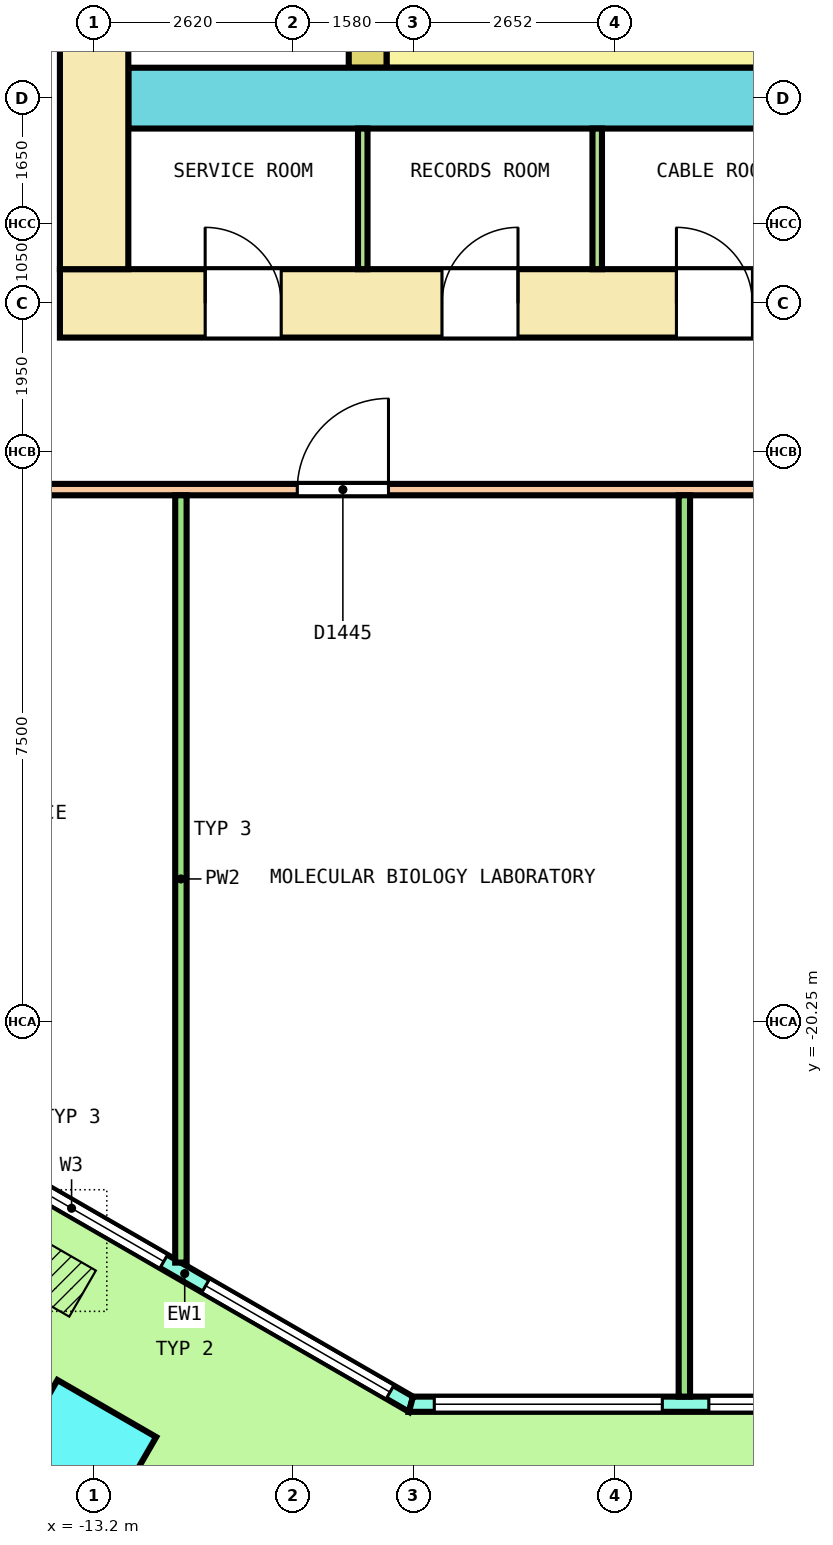
"""IFC4 building model, lengths in metres.
Left out: names, types, materials, properties, quantities, classifications, styles, units other than length and angle.
Written with IfcOpenShell. Run it as: python <this file> out.ifc"""

import sys

from ifc_helpers import new_model, si_unit, direction, frame, frame_2d, origin, origin_2d, place, context, subcontext, project, spatial, polyline, rectangle, outline, extrude, element, fill, save


model = new_model("IFC4")
c1 = context("Model", 3, precision=1e-05, world=origin(), true_north=direction((0.0, 1.0)))
c2 = subcontext(c1, "Body", "Model", "MODEL_VIEW")
j1 = project(units=[si_unit("LENGTHUNIT", "METRE"), si_unit("PLANEANGLEUNIT", "RADIAN")], contexts=[c1])
p1 = place(None, origin())
s1 = spatial("IfcSite", under=j1, at=p1, CompositionType="ELEMENT")
p2 = place(p1, origin())
s2 = spatial("IfcBuilding", under=s1, at=p2, CompositionType="ELEMENT")
p3 = place(p2, frame((0.0, 0.0, 58.6)))
s3 = spatial("IfcBuildingStorey", under=s2, at=p3, CompositionType="ELEMENT", Elevation=58.6)
p4 = place(p3, frame((-13.408, -25.989, 0.0), z_axis=(0.0, 0.0, 1.0), x_axis=(0.866025403784, -0.5, 0.0)))
e1 = element("IfcColumn", 1, at=p4, inside=s3, PredefinedType="COLUMN", context=c2, shape_type="SweptSolid", body=[
    extrude(rectangle(XDim=1.5, YDim=1.5, at=origin_2d()), origin(), (0.0, 0.0, 1.0), 4.05),
])
p5 = place(p3, frame((-14.985, -21.845, 0.0), z_axis=(0.0, 0.0, 1.0), x_axis=(0.866029458321, -0.49999297727, 0.0)))
e2 = element("IfcWall", 2, at=p5, inside=s3, PredefinedType="SOLIDWALL", context=c2, shape_type="SweptSolid", body=[
    extrude(outline(polyline([(-0.027, -0.1), (1.128, -0.1), (2.282, -0.1), (3.437, -0.1), (4.592, -0.1), (5.747, -0.1), (6.901, -0.1), (6.848, 0.1), (5.711, 0.1), (4.574, 0.1), (3.437, 0.1), (2.301, 0.1), (1.164, 0.1), (0.027, 0.1), (-0.027, -0.1)])), origin(), (0.0, 0.0, 1.0), 4.1),
])
p6 = place(p5, frame((0.319, 0.0, 0.1)))
e3 = element("IfcOpeningElement", 3, at=p6, cuts=e2, PredefinedType="OPENING", context=c2, shape_type="SweptSolid", body=[
    extrude(rectangle(XDim=2.8, YDim=2.9, at=frame_2d((1.4, 1.45))), frame((0.0, 0.11, 0.0), z_axis=(0.0, -1.0, 0.0), x_axis=(1.0, 0.0, 0.0)), (0.0, 0.0, 1.0), 0.22),
])
p7 = place(p5, frame((3.756, 0.0, 0.1)))
e4 = element("IfcOpeningElement", 4, at=p7, cuts=e2, PredefinedType="OPENING", context=c2, shape_type="SweptSolid", body=[
    extrude(rectangle(XDim=2.8, YDim=2.9, at=frame_2d((1.4, 1.45))), frame((0.0, 0.11, 0.0), z_axis=(0.0, -1.0, 0.0), x_axis=(1.0, 0.0, 0.0)), (0.0, 0.0, 1.0), 0.22),
])
p8 = place(p3, frame((-9.031, -25.283, 0.0), z_axis=(0.0, 0.0, 1.0), x_axis=(1.0, 0.0, 0.0)))
e5 = element("IfcWall", 5, at=p8, inside=s3, PredefinedType="SOLIDWALL", context=c2, shape_type="SweptSolid", body=[
    extrude(outline(polyline([(-0.027, -0.1), (0.979, -0.1), (1.986, -0.1), (2.992, -0.1), (3.999, -0.1), (5.005, -0.1), (6.012, -0.1), (7.018, -0.1), (8.025, -0.1), (9.031, -0.1), (10.038, -0.1), (11.044, -0.1), (12.051, -0.1), (13.057, -0.1), (14.063, -0.1), (15.07, -0.1), (16.076, -0.1), (17.083, -0.1), (18.089, -0.1), (18.036, 0.1), (17.035, 0.1), (16.035, 0.1), (15.034, 0.1), (14.034, 0.1), (13.033, 0.1), (12.033, 0.1), (11.032, 0.1), (10.032, 0.1), (9.031, 0.1), (8.031, 0.1), (7.03, 0.1), (6.03, 0.1), (5.029, 0.1), (4.029, 0.1), (3.028, 0.1), (2.028, 0.1), (1.027, 0.1), (0.027, 0.1), (-0.027, -0.1)])), origin(), (0.0, 0.0, 1.0), 4.1),
])
p9 = place(p8, frame((0.306, 0.0, 0.1)))
e6 = element("IfcOpeningElement", 6, at=p9, cuts=e5, PredefinedType="OPENING", context=c2, shape_type="SweptSolid", body=[
    extrude(rectangle(XDim=3.0, YDim=2.9, at=frame_2d((1.5, 1.45))), frame((0.0, 0.11, 0.0), z_axis=(0.0, -1.0, 0.0), x_axis=(1.0, 0.0, 0.0)), (0.0, 0.0, 1.0), 0.22),
])
p10 = place(p8, frame((3.919, 0.0, 0.1)))
e7 = element("IfcOpeningElement", 7, at=p10, cuts=e5, PredefinedType="OPENING", context=c2, shape_type="SweptSolid", body=[
    extrude(rectangle(XDim=3.0, YDim=2.9, at=frame_2d((1.5, 1.45))), frame((0.0, 0.11, 0.0), z_axis=(0.0, -1.0, 0.0), x_axis=(1.0, 0.0, 0.0)), (0.0, 0.0, 1.0), 0.22),
])
p11 = place(p8, frame((8.131, 0.0, 0.0)))
e8 = element("IfcOpeningElement", 8, at=p11, cuts=e5, PredefinedType="OPENING", context=c2, shape_type="SweptSolid", body=[
    extrude(rectangle(XDim=1.8, YDim=2.4, at=frame_2d((0.9, 1.2))), frame((0.0, 0.11, 0.0), z_axis=(0.0, -1.0, 0.0), x_axis=(1.0, 0.0, 0.0)), (0.0, 0.0, 1.0), 0.22),
])
p12 = place(p8, frame((8.131, 0.0, 2.55)))
e9 = element("IfcOpeningElement", 9, at=p12, cuts=e5, PredefinedType="OPENING", context=c2, shape_type="SweptSolid", body=[
    extrude(rectangle(XDim=1.8, YDim=0.45, at=frame_2d((0.9, 0.225))), frame((0.0, 0.11, 0.0), z_axis=(0.0, -1.0, 0.0), x_axis=(1.0, 0.0, 0.0)), (0.0, 0.0, 1.0), 0.22),
])
p13 = place(p8, frame((11.144, 0.0, 0.1)))
e10 = element("IfcOpeningElement", 10, at=p13, cuts=e5, PredefinedType="OPENING", context=c2, shape_type="SweptSolid", body=[
    extrude(rectangle(XDim=3.0, YDim=2.9, at=frame_2d((1.5, 1.45))), frame((0.0, 0.11, 0.0), z_axis=(0.0, -1.0, 0.0), x_axis=(1.0, 0.0, 0.0)), (0.0, 0.0, 1.0), 0.22),
])
p14 = place(p8, frame((14.756, 0.0, 0.1)))
e11 = element("IfcOpeningElement", 11, at=p14, cuts=e5, PredefinedType="OPENING", context=c2, shape_type="SweptSolid", body=[
    extrude(rectangle(XDim=3.0, YDim=2.9, at=frame_2d((1.5, 1.45))), frame((0.0, 0.11, 0.0), z_axis=(0.0, -1.0, 0.0), x_axis=(1.0, 0.0, 0.0)), (0.0, 0.0, 1.0), 0.22),
])
p15 = place(p3, frame((-13.65, -10.8, 0.0), z_axis=(0.0, 0.0, 1.0), x_axis=(1.0, 0.0, 0.0)))
e12 = element("IfcWall", 12, at=p15, inside=s3, PredefinedType="SHEAR", context=c2, shape_type="SweptSolid", body=[
    extrude(rectangle(XDim=27.3, YDim=0.9, at=frame_2d((13.65, 0.0))), origin(), (0.0, 0.0, 1.0), 4.1),
])
p16 = place(p15, frame((1.911, 0.0, 0.0)))
e13 = element("IfcOpeningElement", 13, at=p16, cuts=e12, PredefinedType="OPENING", context=c2, shape_type="SweptSolid", body=[
    extrude(rectangle(XDim=1.0, YDim=2.1, at=frame_2d((0.5, 1.05))), frame((0.0, 0.46, 0.0), z_axis=(0.0, -1.0, 0.0), x_axis=(1.0, 0.0, 0.0)), (0.0, 0.0, 1.0), 0.92),
])
p17 = place(p15, frame((5.027, 0.0, 0.0)))
e14 = element("IfcOpeningElement", 14, at=p17, cuts=e12, PredefinedType="OPENING", context=c2, shape_type="SweptSolid", body=[
    extrude(rectangle(XDim=1.0, YDim=2.1, at=frame_2d((0.5, 1.05))), frame((0.0, 0.46, 0.0), z_axis=(0.0, -1.0, 0.0), x_axis=(1.0, 0.0, 0.0)), (0.0, 0.0, 1.0), 0.92),
])
p18 = place(p15, frame((8.111, 0.0, 0.0)))
e15 = element("IfcOpeningElement", 15, at=p18, cuts=e12, PredefinedType="OPENING", context=c2, shape_type="SweptSolid", body=[
    extrude(rectangle(XDim=1.0, YDim=2.1, at=frame_2d((0.5, 1.05))), frame((0.0, 0.46, 0.0), z_axis=(0.0, -1.0, 0.0), x_axis=(1.0, 0.0, 0.0)), (0.0, 0.0, 1.0), 0.92),
])
p19 = place(p15, frame((11.195, 0.0, 0.0)))
e16 = element("IfcOpeningElement", 16, at=p19, cuts=e12, PredefinedType="OPENING", context=c2, shape_type="SweptSolid", body=[
    extrude(rectangle(XDim=1.0, YDim=2.1, at=frame_2d((0.5, 1.05))), frame((0.0, 0.46, 0.0), z_axis=(0.0, -1.0, 0.0), x_axis=(1.0, 0.0, 0.0)), (0.0, 0.0, 1.0), 0.92),
])
p20 = place(p15, frame((19.202, 0.0, 0.0)))
e17 = element("IfcOpeningElement", 17, at=p20, cuts=e12, PredefinedType="OPENING", context=c2, shape_type="SweptSolid", body=[
    extrude(rectangle(XDim=1.0, YDim=2.1, at=frame_2d((0.5, 1.05))), frame((0.0, 0.46, 0.0), z_axis=(0.0, -1.0, 0.0), x_axis=(1.0, 0.0, 0.0)), (0.0, 0.0, 1.0), 0.92),
])
p21 = place(p15, frame((21.881, 0.0, 0.0)))
e18 = element("IfcOpeningElement", 18, at=p21, cuts=e12, PredefinedType="OPENING", context=c2, shape_type="SweptSolid", body=[
    extrude(rectangle(XDim=1.0, YDim=2.1, at=frame_2d((0.5, 1.05))), frame((0.0, 0.46, 0.0), z_axis=(0.0, -1.0, 0.0), x_axis=(1.0, 0.0, 0.0)), (0.0, 0.0, 1.0), 0.92),
])
p22 = place(p15, frame((24.592, 0.0, 0.0)))
e19 = element("IfcOpeningElement", 19, at=p22, cuts=e12, PredefinedType="OPENING", context=c2, shape_type="SweptSolid", body=[
    extrude(rectangle(XDim=1.0, YDim=2.1, at=frame_2d((0.5, 1.05))), frame((0.0, 0.46, 0.0), z_axis=(0.0, -1.0, 0.0), x_axis=(1.0, 0.0, 0.0)), (0.0, 0.0, 1.0), 0.92),
])
p23 = place(p15, frame((15.2, 0.0, 0.0)))
e20 = element("IfcOpeningElement", 20, at=p23, cuts=e12, PredefinedType="OPENING", context=c2, shape_type="SweptSolid", body=[
    extrude(rectangle(XDim=1.2, YDim=2.1, at=frame_2d((0.6, 1.05))), frame((0.0, 0.46, 0.0), z_axis=(0.0, -1.0, 0.0), x_axis=(1.0, 0.0, 0.0)), (0.0, 0.0, 1.0), 0.92),
])
p24 = place(p3, frame((-13.2, -10.35, 0.0), z_axis=(0.0, 0.0, 1.0), x_axis=(0.0, 1.0, 0.0)))
e21 = element("IfcWall", 21, at=p24, inside=s3, PredefinedType="SHEAR", context=c2, shape_type="SweptSolid", body=[
    extrude(rectangle(XDim=20.7, YDim=0.9, at=frame_2d((10.35, 0.0))), origin(), (0.0, 0.0, 1.0), 4.1),
])
p25 = place(p24, frame((9.15, 0.0, 0.0)))
e22 = element("IfcOpeningElement", 22, at=p25, cuts=e21, PredefinedType="OPENING", context=c2, shape_type="SweptSolid", body=[
    extrude(rectangle(XDim=2.4, YDim=2.1, at=frame_2d((1.2, 1.05))), frame((0.0, 0.46, 0.0), z_axis=(0.0, -1.0, 0.0), x_axis=(1.0, 0.0, 0.0)), (0.0, 0.0, 1.0), 0.92),
])
p26 = place(p24, frame((16.05, 0.0, 0.0)))
e23 = element("IfcOpeningElement", 23, at=p26, cuts=e21, PredefinedType="OPENING", context=c2, shape_type="SweptSolid", body=[
    extrude(rectangle(XDim=1.2, YDim=2.1, at=frame_2d((0.6, 1.05))), frame((0.0, 0.46, 0.0), z_axis=(0.0, -1.0, 0.0), x_axis=(1.0, 0.0, 0.0)), (0.0, 0.0, 1.0), 0.92),
])
p27 = place(p24, frame((3.45, 0.0, 0.0)))
e24 = element("IfcOpeningElement", 24, at=p27, cuts=e21, PredefinedType="OPENING", context=c2, shape_type="SweptSolid", body=[
    extrude(rectangle(XDim=1.2, YDim=2.1, at=frame_2d((0.6, 1.05))), frame((0.0, 0.46, 0.0), z_axis=(0.0, -1.0, 0.0), x_axis=(1.0, 0.0, 0.0)), (0.0, 0.0, 1.0), 0.92),
])
p28 = place(p3, frame((-12.75, -8.1, 0.0), z_axis=(0.0, 0.0, 1.0), x_axis=(1.0, 0.0, 0.0)))
e25 = element("IfcWall", 25, at=p28, inside=s3, PredefinedType="SHEAR", context=c2, shape_type="SweptSolid", body=[
    extrude(rectangle(XDim=25.5, YDim=0.8, at=frame_2d((12.75, 0.0))), origin(), (0.0, 0.0, 1.0), 4.1),
])
p29 = place(p28, frame((14.3, 0.0, 0.0)))
e26 = element("IfcOpeningElement", 26, at=p29, cuts=e25, PredefinedType="OPENING", context=c2, shape_type="SweptSolid", body=[
    extrude(rectangle(XDim=1.2, YDim=2.1, at=frame_2d((0.6, 1.05))), frame((0.0, 0.41, 0.0), z_axis=(0.0, -1.0, 0.0), x_axis=(1.0, 0.0, 0.0)), (0.0, 0.0, 1.0), 0.82),
])
p30 = place(p3, frame((-9.6, -7.7, 0.0), z_axis=(0.0, 0.0, 1.0), x_axis=(0.0, 1.0, 0.0)))
e27 = element("IfcWall", 27, at=p30, inside=s3, PredefinedType="SHEAR", context=c2, shape_type="SweptSolid", body=[
    extrude(rectangle(XDim=15.4, YDim=0.5, at=frame_2d((7.7, 0.0))), origin(), (0.0, 0.0, 1.0), 4.1),
])
p31 = place(p30, frame((6.5, 0.0, 0.0)))
e28 = element("IfcOpeningElement", 28, at=p31, cuts=e27, PredefinedType="OPENING", context=c2, shape_type="SweptSolid", body=[
    extrude(rectangle(XDim=2.4, YDim=2.1, at=frame_2d((1.2, 1.05))), frame((0.0, 0.26, 0.0), z_axis=(0.0, -1.0, 0.0), x_axis=(1.0, 0.0, 0.0)), (0.0, 0.0, 1.0), 0.52),
])
p32 = place(p30, frame((13.4, 0.0, 0.0)))
e29 = element("IfcOpeningElement", 29, at=p32, cuts=e27, PredefinedType="OPENING", context=c2, shape_type="SweptSolid", body=[
    extrude(rectangle(XDim=1.2, YDim=2.1, at=frame_2d((0.6, 1.05))), frame((0.0, 0.26, 0.0), z_axis=(0.0, -1.0, 0.0), x_axis=(1.0, 0.0, 0.0)), (0.0, 0.0, 1.0), 0.52),
])
p33 = place(p30, frame((0.8, 0.0, 0.0)))
e30 = element("IfcOpeningElement", 30, at=p33, cuts=e27, PredefinedType="OPENING", context=c2, shape_type="SweptSolid", body=[
    extrude(rectangle(XDim=1.2, YDim=2.1, at=frame_2d((0.6, 1.05))), frame((0.0, 0.26, 0.0), z_axis=(0.0, -1.0, 0.0), x_axis=(1.0, 0.0, 0.0)), (0.0, 0.0, 1.0), 0.52),
])
p34 = place(p3, frame((-9.35, -7.575, 0.0), z_axis=(0.0, 0.0, 1.0), x_axis=(1.0, 0.0, 0.0)))
e31 = element("IfcWall", 31, at=p34, inside=s3, PredefinedType="SOLIDWALL", context=c2, shape_type="SweptSolid", body=[
    extrude(rectangle(XDim=5.8, YDim=0.25, at=frame_2d((2.9, 0.0))), origin(), (0.0, 0.0, 1.0), 4.1),
])
for number, where, z_axis, x_axis in (
    (32, (-9.666, -10.35, 0.0), (0.0, 0.0, 1.0), (0.0, 1.0, 0.0)),
    (33, (-6.581, -10.35, 0.0), (0.0, 0.0, 1.0), (0.0, 1.0, 0.0)),
):
    element("IfcWall", number, at=place(p3, frame(where, z_axis=z_axis, x_axis=x_axis)), inside=s3, PredefinedType="PARTITIONING", context=c2, shape_type="SweptSolid", body=[
        extrude(rectangle(XDim=1.85, YDim=0.125, at=frame_2d((0.925, 0.0))), origin(), (0.0, 0.0, 1.0), 4.1),
    ])
p35 = place(p3, frame((-15.725, -13.25, 0.0), z_axis=(0.0, 0.0, 1.0), x_axis=(1.0, 0.0, 0.0)))
e34 = element("IfcWall", 34, at=p35, inside=s3, PredefinedType="PARTITIONING", context=c2, shape_type="SweptSolid", body=[
    extrude(rectangle(XDim=31.325, YDim=0.15, at=frame_2d((15.663, 0.0))), origin(), (0.0, 0.0, 1.0), 3.05),
])
p36 = place(p35, frame((0.898, 0.0, 0.0)))
e35 = element("IfcOpeningElement", 35, at=p36, cuts=e34, PredefinedType="OPENING", context=c2, shape_type="SweptSolid", body=[
    extrude(rectangle(XDim=1.0, YDim=2.1, at=frame_2d((0.5, 1.05))), frame((0.0, 0.085, 0.0), z_axis=(0.0, -1.0, 0.0), x_axis=(1.0, 0.0, 0.0)), (0.0, 0.0, 1.0), 0.17),
])
p37 = place(p35, frame((5.198, 0.0, 0.0)))
e36 = element("IfcOpeningElement", 36, at=p37, cuts=e34, PredefinedType="OPENING", context=c2, shape_type="SweptSolid", body=[
    extrude(rectangle(XDim=1.2, YDim=2.1, at=frame_2d((0.6, 1.05))), frame((0.0, 0.085, 0.0), z_axis=(0.0, -1.0, 0.0), x_axis=(1.0, 0.0, 0.0)), (0.0, 0.0, 1.0), 0.17),
])
p38 = place(p35, frame((14.115, 0.0, 0.0)))
e37 = element("IfcOpeningElement", 37, at=p38, cuts=e34, PredefinedType="OPENING", context=c2, shape_type="SweptSolid", body=[
    extrude(rectangle(XDim=1.2, YDim=2.1, at=frame_2d((0.6, 1.05))), frame((0.0, 0.085, 0.0), z_axis=(0.0, -1.0, 0.0), x_axis=(1.0, 0.0, 0.0)), (0.0, 0.0, 1.0), 0.17),
])
p39 = place(p35, frame((22.046, 0.0, 0.0)))
e38 = element("IfcOpeningElement", 38, at=p39, cuts=e34, PredefinedType="OPENING", context=c2, shape_type="SweptSolid", body=[
    extrude(rectangle(XDim=1.0, YDim=2.1, at=frame_2d((0.5, 1.05))), frame((0.0, 0.085, 0.0), z_axis=(0.0, -1.0, 0.0), x_axis=(1.0, 0.0, 0.0)), (0.0, 0.0, 1.0), 0.17),
])
p40 = place(p35, frame((28.358, 0.0, 0.0)))
e39 = element("IfcOpeningElement", 39, at=p40, cuts=e34, PredefinedType="OPENING", context=c2, shape_type="SweptSolid", body=[
    extrude(rectangle(XDim=1.0, YDim=2.1, at=frame_2d((0.5, 1.05))), frame((0.0, 0.085, 0.0), z_axis=(0.0, -1.0, 0.0), x_axis=(1.0, 0.0, 0.0)), (0.0, 0.0, 1.0), 0.17),
])
p41 = place(p3, frame((-12.058, -23.42, 0.0), z_axis=(0.0, 0.0, 1.0), x_axis=(0.0, 1.0, 0.0)))
e40 = element("IfcWall", 40, at=p41, inside=s3, PredefinedType="PARTITIONING", context=c2, shape_type="SweptSolid", body=[
    extrude(rectangle(XDim=10.095, YDim=0.15, at=frame_2d((5.047, 0.0))), origin(), (0.0, 0.0, 1.0), 3.05),
])
p42 = place(p3, frame((-5.435, -25.183, 0.0), z_axis=(0.0, 0.0, 1.0), x_axis=(0.0, 1.0, 0.0)))
e41 = element("IfcWall", 41, at=p42, inside=s3, PredefinedType="PARTITIONING", context=c2, shape_type="SweptSolid", body=[
    extrude(rectangle(XDim=11.858, YDim=0.15, at=frame_2d((5.929, 0.0))), origin(), (0.0, 0.0, 1.0), 3.05),
])
p43 = place(p6, origin())
e42 = element("IfcWindow", 42, at=p43, inside=s3, PartitioningType="SINGLE_PANEL", PredefinedType="WINDOW", context=c2, shape_type="SweptSolid", body=[
    extrude(rectangle(XDim=2.8, YDim=2.9, at=frame_2d((1.4, 1.45))), frame((0.0, 0.03, 0.0), z_axis=(0.0, -1.0, 0.0), x_axis=(1.0, 0.0, 0.0)), (0.0, 0.0, 1.0), 0.06),
])
fill(e3, e42)
p44 = place(p7, origin())
e43 = element("IfcWindow", 43, at=p44, inside=s3, PartitioningType="SINGLE_PANEL", PredefinedType="WINDOW", context=c2, shape_type="SweptSolid", body=[
    extrude(rectangle(XDim=2.8, YDim=2.9, at=frame_2d((1.4, 1.45))), frame((0.0, 0.03, 0.0), z_axis=(0.0, -1.0, 0.0), x_axis=(1.0, 0.0, 0.0)), (0.0, 0.0, 1.0), 0.06),
])
fill(e4, e43)
p45 = place(p9, origin())
e44 = element("IfcWindow", 44, at=p45, inside=s3, PartitioningType="SINGLE_PANEL", PredefinedType="WINDOW", context=c2, shape_type="SweptSolid", body=[
    extrude(rectangle(XDim=3.0, YDim=2.9, at=frame_2d((1.5, 1.45))), frame((0.0, 0.03, 0.0), z_axis=(0.0, -1.0, 0.0), x_axis=(1.0, 0.0, 0.0)), (0.0, 0.0, 1.0), 0.06),
])
fill(e6, e44)
p46 = place(p10, origin())
e45 = element("IfcWindow", 45, at=p46, inside=s3, PartitioningType="SINGLE_PANEL", PredefinedType="WINDOW", context=c2, shape_type="SweptSolid", body=[
    extrude(rectangle(XDim=3.0, YDim=2.9, at=frame_2d((1.5, 1.45))), frame((0.0, 0.03, 0.0), z_axis=(0.0, -1.0, 0.0), x_axis=(1.0, 0.0, 0.0)), (0.0, 0.0, 1.0), 0.06),
])
fill(e7, e45)
p47 = place(p16, origin())
e46 = element("IfcDoor", 46, at=p47, inside=s3, OperationType="SINGLE_SWING_LEFT", PredefinedType="DOOR", context=c2, shape_type="SweptSolid", body=[
    extrude(rectangle(XDim=1.0, YDim=2.1, at=frame_2d((0.5, 1.05))), frame((0.0, 0.3, 0.0), z_axis=(0.0, -1.0, 0.0), x_axis=(1.0, 0.0, 0.0)), (0.0, 0.0, 1.0), 0.6),
])
fill(e13, e46)
p48 = place(p17, origin())
e47 = element("IfcDoor", 47, at=p48, inside=s3, OperationType="SINGLE_SWING_RIGHT", PredefinedType="DOOR", context=c2, shape_type="SweptSolid", body=[
    extrude(rectangle(XDim=1.0, YDim=2.1, at=frame_2d((0.5, 1.05))), frame((0.0, 0.3, 0.0), z_axis=(0.0, -1.0, 0.0), x_axis=(1.0, 0.0, 0.0)), (0.0, 0.0, 1.0), 0.6),
])
fill(e14, e47)
p49 = place(p18, origin())
e48 = element("IfcDoor", 48, at=p49, inside=s3, OperationType="SINGLE_SWING_LEFT", PredefinedType="DOOR", context=c2, shape_type="SweptSolid", body=[
    extrude(rectangle(XDim=1.0, YDim=2.1, at=frame_2d((0.5, 1.05))), frame((0.0, 0.3, 0.0), z_axis=(0.0, -1.0, 0.0), x_axis=(1.0, 0.0, 0.0)), (0.0, 0.0, 1.0), 0.6),
])
fill(e15, e48)
p50 = place(p37, origin())
e49 = element("IfcDoor", 49, at=p50, inside=s3, OperationType="DOUBLE_DOOR_SINGLE_SWING", PredefinedType="DOOR", context=c2, shape_type="SweptSolid", body=[
    extrude(rectangle(XDim=1.2, YDim=2.1, at=frame_2d((0.6, 1.05))), frame((0.0, 0.025, 0.0), z_axis=(0.0, -1.0, 0.0), x_axis=(1.0, 0.0, 0.0)), (0.0, 0.0, 1.0), 0.05),
])
fill(e36, e49)
save(model, sys.argv[1])
